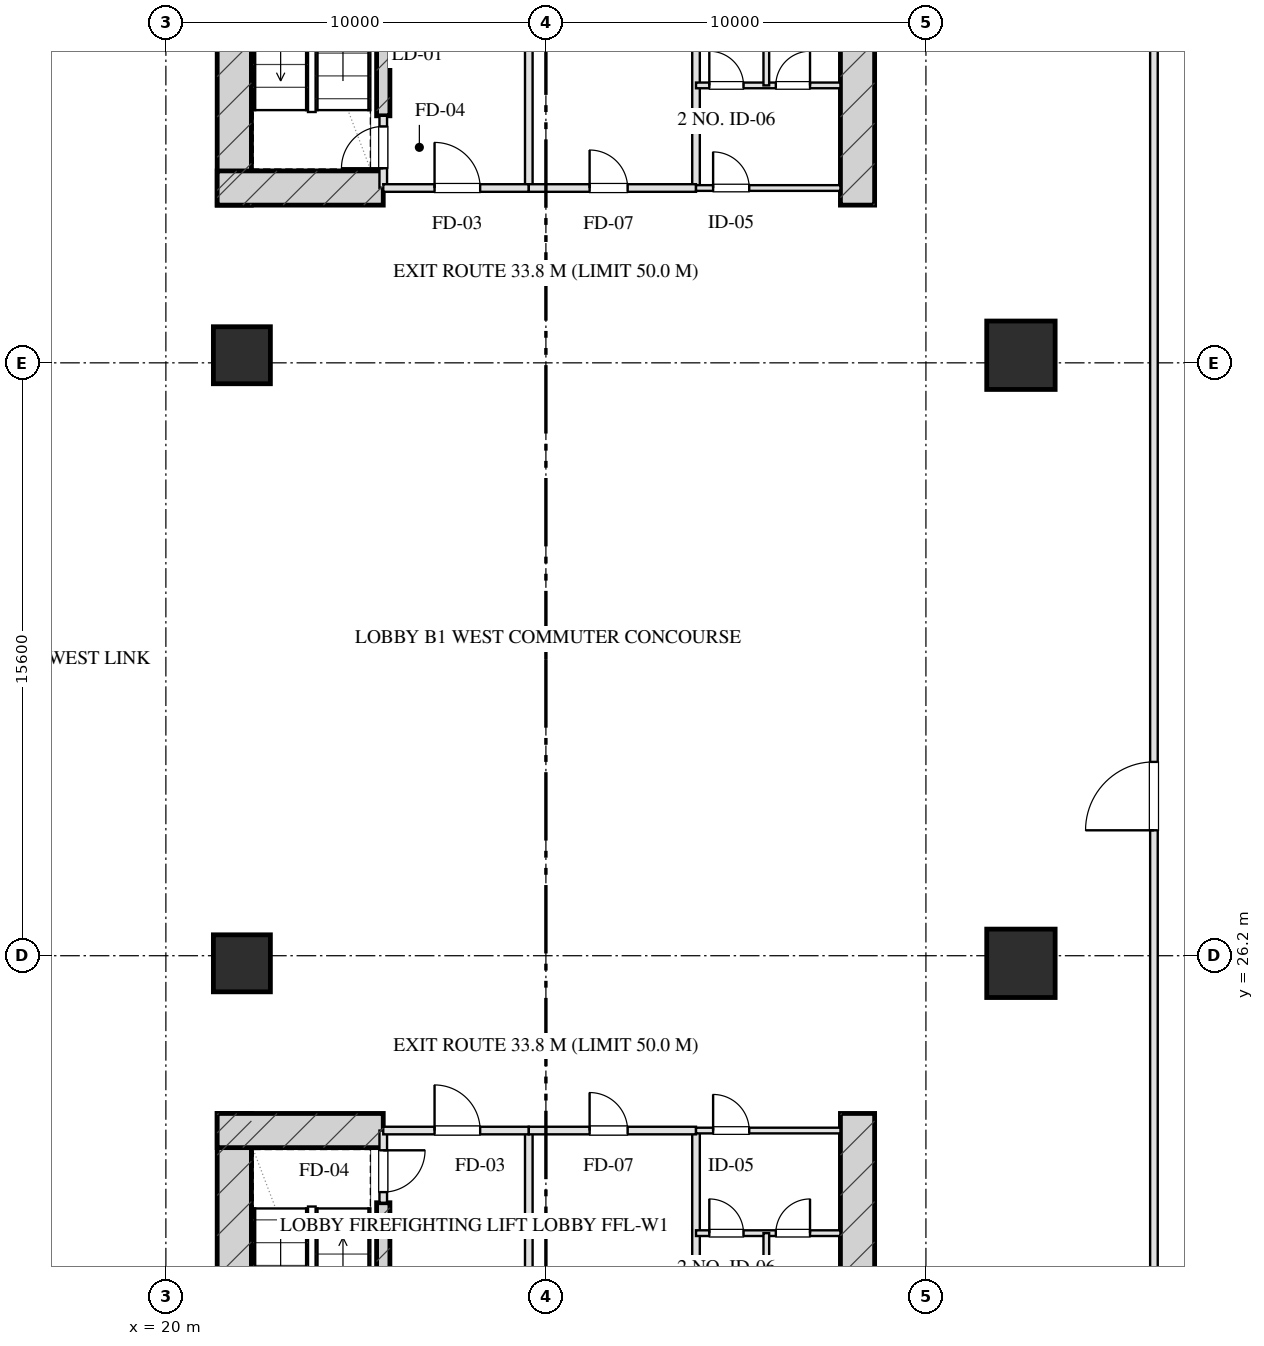
"""IFC4 building model, lengths in metres.
Left out: names, types, materials, properties, quantities, classifications, styles, units other than length and angle.
Written with IfcOpenShell. Run it as: python <this file> out.ifc"""

import sys

from ifc_helpers import new_model, si_unit, direction, frame, frame_2d, origin, origin_2d, place, context, subcontext, project, spatial, rectangle, hollow_rectangle, extrude, element, fill, save


model = new_model("IFC4")
c1 = context("Model", 3, precision=1e-05, world=origin(), true_north=direction((0.0, 1.0)))
c2 = subcontext(c1, "Body", "Model", "MODEL_VIEW")
j1 = project(units=[si_unit("LENGTHUNIT", "METRE"), si_unit("PLANEANGLEUNIT", "RADIAN")], contexts=[c1])
p1 = place(None, origin())
s1 = spatial("IfcSite", under=j1, at=p1, CompositionType="ELEMENT")
p2 = place(p1, origin())
s2 = spatial("IfcBuilding", under=s1, at=p2, CompositionType="ELEMENT")
p3 = place(p2, frame((0.0, 0.0, -6.0)))
s3 = spatial("IfcBuildingStorey", under=s2, at=p3, CompositionType="ELEMENT", Elevation=-6.0)
for number, where, z_axis, x_axis in (
    (1, (21.8, 22.05, 0.0), (0.0, 0.0, 1.0), (0.0, -1.0, 0.0)),
    (2, (38.2, 22.05, 0.0), (0.0, 0.0, 1.0), (0.0, -1.0, 0.0)),
):
    element("IfcWall", number, at=place(p3, frame(where, z_axis=z_axis, x_axis=x_axis)), inside=s3, PredefinedType="SHEAR", context=c2, shape_type="SweptSolid", body=[
        extrude(rectangle(XDim=9.78, YDim=0.9, at=frame_2d((4.89, 0.0))), origin(), (0.0, 0.0, 1.0), 6.0),
    ])
p4 = place(p3, frame((25.72, 19.7, 0.0), z_axis=(0.0, 0.0, 1.0), x_axis=(0.0, -1.0, 0.0)))
e3 = element("IfcWall", 3, at=p4, inside=s3, PredefinedType="SHEAR", context=c2, shape_type="SweptSolid", body=[
    extrude(rectangle(XDim=6.98, YDim=0.35, at=frame_2d((3.49, 0.0))), origin(), (0.0, 0.0, 1.0), 6.0),
])
p5 = place(p3, frame((21.35, 21.6, 0.0), z_axis=(0.0, 0.0, 1.0), x_axis=(1.0, 0.0, 0.0)))
e4 = element("IfcWall", 4, at=p5, inside=s3, PredefinedType="SHEAR", context=c2, shape_type="SweptSolid", body=[
    extrude(rectangle(XDim=4.37, YDim=0.9, at=frame_2d((2.185, 0.0))), origin(), (0.0, 0.0, 1.0), 6.0),
])
for number, where, z_axis, x_axis in (
    (5, (21.8, 45.95, 0.0), (0.0, 0.0, 1.0), (0.0, 1.0, 0.0)),
    (6, (38.2, 45.95, 0.0), (0.0, 0.0, 1.0), (0.0, 1.0, 0.0)),
):
    element("IfcWall", number, at=place(p3, frame(where, z_axis=z_axis, x_axis=x_axis)), inside=s3, PredefinedType="SHEAR", context=c2, shape_type="SweptSolid", body=[
        extrude(rectangle(XDim=9.78, YDim=0.9, at=frame_2d((4.89, 0.0))), origin(), (0.0, 0.0, 1.0), 6.0),
    ])
p6 = place(p3, frame((25.72, 48.3, 0.0), z_axis=(0.0, 0.0, 1.0), x_axis=(0.0, 1.0, 0.0)))
e7 = element("IfcWall", 7, at=p6, inside=s3, PredefinedType="SHEAR", context=c2, shape_type="SweptSolid", body=[
    extrude(rectangle(XDim=6.98, YDim=0.35, at=frame_2d((3.49, 0.0))), origin(), (0.0, 0.0, 1.0), 6.0),
])
p7 = place(p3, frame((21.35, 46.4, 0.0), z_axis=(0.0, 0.0, 1.0), x_axis=(1.0, 0.0, 0.0)))
e8 = element("IfcWall", 8, at=p7, inside=s3, PredefinedType="SHEAR", context=c2, shape_type="SweptSolid", body=[
    extrude(rectangle(XDim=4.37, YDim=0.9, at=frame_2d((2.185, 0.0))), origin(), (0.0, 0.0, 1.0), 6.0),
])
for number, where, z_axis, x_axis in (
    (9, (22.0, 26.0, 0.0), (0.0, 0.0, 1.0), (1.0, 0.0, 0.0)),
    (10, (22.0, 42.0, 0.0), (0.0, 0.0, 1.0), (1.0, 0.0, 0.0)),
):
    element("IfcColumn", number, at=place(p3, frame(where, z_axis=z_axis, x_axis=x_axis)), inside=s3, PredefinedType="COLUMN", context=c2, shape_type="SweptSolid", body=[
        extrude(rectangle(XDim=1.5, YDim=1.5, at=origin_2d()), origin(), (0.0, 0.0, 1.0), 6.001),
    ])
for number, where, z_axis, x_axis in (
    (11, (42.5, 26.0, 0.0), (0.0, 0.0, 1.0), (1.0, 0.0, 0.0)),
    (12, (42.5, 42.0, 0.0), (0.0, 0.0, 1.0), (1.0, 0.0, 0.0)),
):
    element("IfcColumn", number, at=place(p3, frame(where, z_axis=z_axis, x_axis=x_axis)), inside=s3, PredefinedType="COLUMN", context=c2, shape_type="SweptSolid", body=[
        extrude(hollow_rectangle(XDim=1.8, YDim=1.8, WallThickness=0.06, at=origin_2d()), origin(), (0.0, 0.0, 1.0), 6.001),
    ])
p8 = place(p3, frame((25.72, 21.6, 0.0), z_axis=(0.0, 0.0, 1.0), x_axis=(0.0, -1.0, 0.0)))
e13 = element("IfcWall", 13, at=p8, inside=s3, PredefinedType="PARTITIONING", context=c2, shape_type="SweptSolid", body=[
    extrude(rectangle(XDim=1.9, YDim=0.2, at=frame_2d((0.95, 0.0))), origin(), (0.0, 0.0, 1.0), 5.685),
])
p9 = place(p8, frame((0.52, 0.0, 0.0)))
e14 = element("IfcOpeningElement", 14, at=p9, cuts=e13, PredefinedType="OPENING", context=c2, shape_type="SweptSolid", body=[
    extrude(rectangle(XDim=1.1, YDim=2.05, at=frame_2d((0.55, 1.025))), frame((0.0, 0.11, 0.0), z_axis=(0.0, -1.0, 0.0), x_axis=(1.0, 0.0, 0.0)), (0.0, 0.0, 1.0), 0.22),
])
p10 = place(p3, frame((29.55, 21.6, 0.0), z_axis=(0.0, 0.0, 1.0), x_axis=(0.0, -1.0, 0.0)))
e15 = element("IfcWall", 15, at=p10, inside=s3, PredefinedType="PARTITIONING", context=c2, shape_type="SweptSolid", body=[
    extrude(rectangle(XDim=8.43, YDim=0.2, at=frame_2d((4.215, 0.0))), origin(), (0.0, 0.0, 1.0), 5.685),
])
p11 = place(p3, frame((25.72, 21.6, 0.0), z_axis=(0.0, 0.0, 1.0), x_axis=(1.0, 0.0, 0.0)))
e16 = element("IfcWall", 16, at=p11, inside=s3, PredefinedType="PARTITIONING", context=c2, shape_type="SweptSolid", body=[
    extrude(rectangle(XDim=3.83, YDim=0.2, at=frame_2d((1.915, 0.0))), origin(), (0.0, 0.0, 1.0), 5.685),
])
p12 = place(p11, frame((1.35, 0.0, 0.0)))
e17 = element("IfcOpeningElement", 17, at=p12, cuts=e16, PredefinedType="OPENING", context=c2, shape_type="SweptSolid", body=[
    extrude(rectangle(XDim=1.2, YDim=2.05, at=frame_2d((0.6, 1.025))), frame((0.0, 0.11, 0.0), z_axis=(0.0, -1.0, 0.0), x_axis=(1.0, 0.0, 0.0)), (0.0, 0.0, 1.0), 0.22),
])
p13 = place(p3, frame((33.95, 21.6, 0.0), z_axis=(0.0, 0.0, 1.0), x_axis=(0.0, -1.0, 0.0)))
e18 = element("IfcWall", 18, at=p13, inside=s3, PredefinedType="PARTITIONING", context=c2, shape_type="SweptSolid", body=[
    extrude(rectangle(XDim=8.43, YDim=0.2, at=frame_2d((4.215, 0.0))), origin(), (0.0, 0.0, 1.0), 5.685),
])
p14 = place(p3, frame((29.55, 21.6, 0.0), z_axis=(0.0, 0.0, 1.0), x_axis=(1.0, 0.0, 0.0)))
e19 = element("IfcWall", 19, at=p14, inside=s3, PredefinedType="PARTITIONING", context=c2, shape_type="SweptSolid", body=[
    extrude(rectangle(XDim=4.4, YDim=0.2, at=frame_2d((2.2, 0.0))), origin(), (0.0, 0.0, 1.0), 5.685),
])
p15 = place(p14, frame((1.6, 0.0, 0.0)))
e20 = element("IfcOpeningElement", 20, at=p15, cuts=e19, PredefinedType="OPENING", context=c2, shape_type="SweptSolid", body=[
    extrude(rectangle(XDim=1.0, YDim=2.05, at=frame_2d((0.5, 1.025))), frame((0.0, 0.11, 0.0), z_axis=(0.0, -1.0, 0.0), x_axis=(1.0, 0.0, 0.0)), (0.0, 0.0, 1.0), 0.22),
])
p16 = place(p3, frame((33.95, 21.6, 0.0), z_axis=(0.0, 0.0, 1.0), x_axis=(1.0, 0.0, 0.0)))
e21 = element("IfcWall", 21, at=p16, inside=s3, PredefinedType="PARTITIONING", context=c2, shape_type="SweptSolid", body=[
    extrude(rectangle(XDim=3.8, YDim=0.15, at=frame_2d((1.9, 0.0))), origin(), (0.0, 0.0, 1.0), 5.685),
])
p17 = place(p16, frame((0.45, 0.0, 0.0)))
e22 = element("IfcOpeningElement", 22, at=p17, cuts=e21, PredefinedType="OPENING", context=c2, shape_type="SweptSolid", body=[
    extrude(rectangle(XDim=0.95, YDim=2.05, at=frame_2d((0.475, 1.025))), frame((0.0, 0.085, 0.0), z_axis=(0.0, -1.0, 0.0), x_axis=(1.0, 0.0, 0.0)), (0.0, 0.0, 1.0), 0.17),
])
p18 = place(p3, frame((33.95, 18.9, 0.0), z_axis=(0.0, 0.0, 1.0), x_axis=(1.0, 0.0, 0.0)))
e23 = element("IfcWall", 23, at=p18, inside=s3, PredefinedType="PARTITIONING", context=c2, shape_type="SweptSolid", body=[
    extrude(rectangle(XDim=3.8, YDim=0.15, at=frame_2d((1.9, 0.0))), origin(), (0.0, 0.0, 1.0), 5.685),
])
p19 = place(p18, frame((0.35, 0.0, 0.0)))
e24 = element("IfcOpeningElement", 24, at=p19, cuts=e23, PredefinedType="OPENING", context=c2, shape_type="SweptSolid", body=[
    extrude(rectangle(XDim=0.9, YDim=2.05, at=frame_2d((0.45, 1.025))), frame((0.0, 0.085, 0.0), z_axis=(0.0, -1.0, 0.0), x_axis=(1.0, 0.0, 0.0)), (0.0, 0.0, 1.0), 0.17),
])
p20 = place(p18, frame((2.1, 0.0, 0.0)))
e25 = element("IfcOpeningElement", 25, at=p20, cuts=e23, PredefinedType="OPENING", context=c2, shape_type="SweptSolid", body=[
    extrude(rectangle(XDim=0.9, YDim=2.05, at=frame_2d((0.45, 1.025))), frame((0.0, 0.085, 0.0), z_axis=(0.0, -1.0, 0.0), x_axis=(1.0, 0.0, 0.0)), (0.0, 0.0, 1.0), 0.17),
])
p21 = place(p3, frame((35.8, 18.9, 0.0), z_axis=(0.0, 0.0, 1.0), x_axis=(0.0, -1.0, 0.0)))
e26 = element("IfcWall", 26, at=p21, inside=s3, PredefinedType="PARTITIONING", context=c2, shape_type="SweptSolid", body=[
    extrude(rectangle(XDim=5.73, YDim=0.15, at=frame_2d((2.865, 0.0))), origin(), (0.0, 0.0, 1.0), 5.685),
])
p22 = place(p3, frame((25.72, 46.4, 0.0), z_axis=(0.0, 0.0, 1.0), x_axis=(0.0, 1.0, 0.0)))
e27 = element("IfcWall", 27, at=p22, inside=s3, PredefinedType="PARTITIONING", context=c2, shape_type="SweptSolid", body=[
    extrude(rectangle(XDim=1.9, YDim=0.2, at=frame_2d((0.95, 0.0))), origin(), (0.0, 0.0, 1.0), 5.685),
])
p23 = place(p22, frame((0.52, 0.0, 0.0)))
e28 = element("IfcOpeningElement", 28, at=p23, cuts=e27, PredefinedType="OPENING", context=c2, shape_type="SweptSolid", body=[
    extrude(rectangle(XDim=1.1, YDim=2.05, at=frame_2d((0.55, 1.025))), frame((0.0, 0.11, 0.0), z_axis=(0.0, -1.0, 0.0), x_axis=(1.0, 0.0, 0.0)), (0.0, 0.0, 1.0), 0.22),
])
p24 = place(p3, frame((29.55, 46.4, 0.0), z_axis=(0.0, 0.0, 1.0), x_axis=(0.0, 1.0, 0.0)))
e29 = element("IfcWall", 29, at=p24, inside=s3, PredefinedType="PARTITIONING", context=c2, shape_type="SweptSolid", body=[
    extrude(rectangle(XDim=8.43, YDim=0.2, at=frame_2d((4.215, 0.0))), origin(), (0.0, 0.0, 1.0), 5.685),
])
p25 = place(p3, frame((25.72, 46.4, 0.0), z_axis=(0.0, 0.0, 1.0), x_axis=(1.0, 0.0, 0.0)))
e30 = element("IfcWall", 30, at=p25, inside=s3, PredefinedType="PARTITIONING", context=c2, shape_type="SweptSolid", body=[
    extrude(rectangle(XDim=3.83, YDim=0.2, at=frame_2d((1.915, 0.0))), origin(), (0.0, 0.0, 1.0), 5.685),
])
p26 = place(p25, frame((1.35, 0.0, 0.0)))
e31 = element("IfcOpeningElement", 31, at=p26, cuts=e30, PredefinedType="OPENING", context=c2, shape_type="SweptSolid", body=[
    extrude(rectangle(XDim=1.2, YDim=2.05, at=frame_2d((0.6, 1.025))), frame((0.0, 0.11, 0.0), z_axis=(0.0, -1.0, 0.0), x_axis=(1.0, 0.0, 0.0)), (0.0, 0.0, 1.0), 0.22),
])
p27 = place(p3, frame((33.95, 46.4, 0.0), z_axis=(0.0, 0.0, 1.0), x_axis=(0.0, 1.0, 0.0)))
e32 = element("IfcWall", 32, at=p27, inside=s3, PredefinedType="PARTITIONING", context=c2, shape_type="SweptSolid", body=[
    extrude(rectangle(XDim=8.43, YDim=0.2, at=frame_2d((4.215, 0.0))), origin(), (0.0, 0.0, 1.0), 5.685),
])
p28 = place(p3, frame((29.55, 46.4, 0.0), z_axis=(0.0, 0.0, 1.0), x_axis=(1.0, 0.0, 0.0)))
e33 = element("IfcWall", 33, at=p28, inside=s3, PredefinedType="PARTITIONING", context=c2, shape_type="SweptSolid", body=[
    extrude(rectangle(XDim=4.4, YDim=0.2, at=frame_2d((2.2, 0.0))), origin(), (0.0, 0.0, 1.0), 5.685),
])
p29 = place(p28, frame((1.6, 0.0, 0.0)))
e34 = element("IfcOpeningElement", 34, at=p29, cuts=e33, PredefinedType="OPENING", context=c2, shape_type="SweptSolid", body=[
    extrude(rectangle(XDim=1.0, YDim=2.05, at=frame_2d((0.5, 1.025))), frame((0.0, 0.11, 0.0), z_axis=(0.0, -1.0, 0.0), x_axis=(1.0, 0.0, 0.0)), (0.0, 0.0, 1.0), 0.22),
])
p30 = place(p3, frame((33.95, 46.4, 0.0), z_axis=(0.0, 0.0, 1.0), x_axis=(1.0, 0.0, 0.0)))
e35 = element("IfcWall", 35, at=p30, inside=s3, PredefinedType="PARTITIONING", context=c2, shape_type="SweptSolid", body=[
    extrude(rectangle(XDim=3.8, YDim=0.15, at=frame_2d((1.9, 0.0))), origin(), (0.0, 0.0, 1.0), 5.685),
])
p31 = place(p30, frame((0.45, 0.0, 0.0)))
e36 = element("IfcOpeningElement", 36, at=p31, cuts=e35, PredefinedType="OPENING", context=c2, shape_type="SweptSolid", body=[
    extrude(rectangle(XDim=0.95, YDim=2.05, at=frame_2d((0.475, 1.025))), frame((0.0, 0.085, 0.0), z_axis=(0.0, -1.0, 0.0), x_axis=(1.0, 0.0, 0.0)), (0.0, 0.0, 1.0), 0.17),
])
p32 = place(p3, frame((33.95, 49.1, 0.0), z_axis=(0.0, 0.0, 1.0), x_axis=(1.0, 0.0, 0.0)))
e37 = element("IfcWall", 37, at=p32, inside=s3, PredefinedType="PARTITIONING", context=c2, shape_type="SweptSolid", body=[
    extrude(rectangle(XDim=3.8, YDim=0.15, at=frame_2d((1.9, 0.0))), origin(), (0.0, 0.0, 1.0), 5.685),
])
p33 = place(p32, frame((0.35, 0.0, 0.0)))
e38 = element("IfcOpeningElement", 38, at=p33, cuts=e37, PredefinedType="OPENING", context=c2, shape_type="SweptSolid", body=[
    extrude(rectangle(XDim=0.9, YDim=2.05, at=frame_2d((0.45, 1.025))), frame((0.0, 0.085, 0.0), z_axis=(0.0, -1.0, 0.0), x_axis=(1.0, 0.0, 0.0)), (0.0, 0.0, 1.0), 0.17),
])
p34 = place(p32, frame((2.1, 0.0, 0.0)))
e39 = element("IfcOpeningElement", 39, at=p34, cuts=e37, PredefinedType="OPENING", context=c2, shape_type="SweptSolid", body=[
    extrude(rectangle(XDim=0.9, YDim=2.05, at=frame_2d((0.45, 1.025))), frame((0.0, 0.085, 0.0), z_axis=(0.0, -1.0, 0.0), x_axis=(1.0, 0.0, 0.0)), (0.0, 0.0, 1.0), 0.17),
])
p35 = place(p3, frame((35.8, 49.1, 0.0), z_axis=(0.0, 0.0, 1.0), x_axis=(0.0, 1.0, 0.0)))
e40 = element("IfcWall", 40, at=p35, inside=s3, PredefinedType="PARTITIONING", context=c2, shape_type="SweptSolid", body=[
    extrude(rectangle(XDim=5.73, YDim=0.15, at=frame_2d((2.865, 0.0))), origin(), (0.0, 0.0, 1.0), 5.685),
])
p36 = place(p3, frame((46.0, 11.5, 0.0), z_axis=(0.0, 0.0, 1.0), x_axis=(0.0, 1.0, 0.0)))
e41 = element("IfcWall", 41, at=p36, inside=s3, PredefinedType="PARTITIONING", context=c2, shape_type="SweptSolid", body=[
    extrude(rectangle(XDim=45.0, YDim=0.2, at=frame_2d((22.5, 0.0))), origin(), (0.0, 0.0, 1.0), 5.685),
])
p37 = place(p36, frame((18.0, 0.0, 0.0)))
e42 = element("IfcOpeningElement", 42, at=p37, cuts=e41, PredefinedType="OPENING", context=c2, shape_type="SweptSolid", body=[
    extrude(rectangle(XDim=1.8, YDim=2.05, at=frame_2d((0.9, 1.025))), frame((0.0, 0.11, 0.0), z_axis=(0.0, -1.0, 0.0), x_axis=(1.0, 0.0, 0.0)), (0.0, 0.0, 1.0), 0.22),
])
p38 = place(p9, origin())
e43 = element("IfcDoor", 43, at=p38, inside=s3, OperationType="SINGLE_SWING_LEFT", PredefinedType="DOOR", context=c2, shape_type="SweptSolid", body=[
    extrude(rectangle(XDim=1.1, YDim=2.05, at=frame_2d((0.55, 1.025))), frame((0.0, 0.025, 0.0), z_axis=(0.0, -1.0, 0.0), x_axis=(1.0, 0.0, 0.0)), (0.0, 0.0, 1.0), 0.05),
])
fill(e14, e43)
p39 = place(p12, origin())
e44 = element("IfcDoor", 44, at=p39, inside=s3, OperationType="SINGLE_SWING_LEFT", PredefinedType="DOOR", context=c2, shape_type="SweptSolid", body=[
    extrude(rectangle(XDim=1.2, YDim=2.05, at=frame_2d((0.6, 1.025))), frame((0.0, 0.025, 0.0), z_axis=(0.0, -1.0, 0.0), x_axis=(1.0, 0.0, 0.0)), (0.0, 0.0, 1.0), 0.05),
])
fill(e17, e44)
p40 = place(p15, origin())
e45 = element("IfcDoor", 45, at=p40, inside=s3, OperationType="SINGLE_SWING_LEFT", PredefinedType="DOOR", context=c2, shape_type="SweptSolid", body=[
    extrude(rectangle(XDim=1.0, YDim=2.05, at=frame_2d((0.5, 1.025))), frame((0.0, 0.025, 0.0), z_axis=(0.0, -1.0, 0.0), x_axis=(1.0, 0.0, 0.0)), (0.0, 0.0, 1.0), 0.05),
])
fill(e20, e45)
p41 = place(p17, origin())
e46 = element("IfcDoor", 46, at=p41, inside=s3, OperationType="SINGLE_SWING_LEFT", PredefinedType="DOOR", context=c2, shape_type="SweptSolid", body=[
    extrude(rectangle(XDim=0.95, YDim=2.05, at=frame_2d((0.475, 1.025))), frame((0.0, 0.025, 0.0), z_axis=(0.0, -1.0, 0.0), x_axis=(1.0, 0.0, 0.0)), (0.0, 0.0, 1.0), 0.05),
])
fill(e22, e46)
p42 = place(p19, origin())
e47 = element("IfcDoor", 47, at=p42, inside=s3, OperationType="SINGLE_SWING_LEFT", PredefinedType="DOOR", context=c2, shape_type="SweptSolid", body=[
    extrude(rectangle(XDim=0.9, YDim=2.05, at=frame_2d((0.45, 1.025))), frame((0.0, 0.025, 0.0), z_axis=(0.0, -1.0, 0.0), x_axis=(1.0, 0.0, 0.0)), (0.0, 0.0, 1.0), 0.05),
])
fill(e24, e47)
p43 = place(p20, origin())
e48 = element("IfcDoor", 48, at=p43, inside=s3, OperationType="SINGLE_SWING_RIGHT", PredefinedType="DOOR", context=c2, shape_type="SweptSolid", body=[
    extrude(rectangle(XDim=0.9, YDim=2.05, at=frame_2d((0.45, 1.025))), frame((0.0, 0.025, 0.0), z_axis=(0.0, -1.0, 0.0), x_axis=(1.0, 0.0, 0.0)), (0.0, 0.0, 1.0), 0.05),
])
fill(e25, e48)
p44 = place(p23, origin())
e49 = element("IfcDoor", 49, at=p44, inside=s3, OperationType="SINGLE_SWING_LEFT", PredefinedType="DOOR", context=c2, shape_type="SweptSolid", body=[
    extrude(rectangle(XDim=1.1, YDim=2.05, at=frame_2d((0.55, 1.025))), frame((0.0, 0.025, 0.0), z_axis=(0.0, -1.0, 0.0), x_axis=(1.0, 0.0, 0.0)), (0.0, 0.0, 1.0), 0.05),
])
fill(e28, e49)
p45 = place(p26, origin())
e50 = element("IfcDoor", 50, at=p45, inside=s3, OperationType="SINGLE_SWING_LEFT", PredefinedType="DOOR", context=c2, shape_type="SweptSolid", body=[
    extrude(rectangle(XDim=1.2, YDim=2.05, at=frame_2d((0.6, 1.025))), frame((0.0, 0.025, 0.0), z_axis=(0.0, -1.0, 0.0), x_axis=(1.0, 0.0, 0.0)), (0.0, 0.0, 1.0), 0.05),
])
fill(e31, e50)
p46 = place(p29, origin())
e51 = element("IfcDoor", 51, at=p46, inside=s3, OperationType="SINGLE_SWING_LEFT", PredefinedType="DOOR", context=c2, shape_type="SweptSolid", body=[
    extrude(rectangle(XDim=1.0, YDim=2.05, at=frame_2d((0.5, 1.025))), frame((0.0, 0.025, 0.0), z_axis=(0.0, -1.0, 0.0), x_axis=(1.0, 0.0, 0.0)), (0.0, 0.0, 1.0), 0.05),
])
fill(e34, e51)
p47 = place(p31, origin())
e52 = element("IfcDoor", 52, at=p47, inside=s3, OperationType="SINGLE_SWING_LEFT", PredefinedType="DOOR", context=c2, shape_type="SweptSolid", body=[
    extrude(rectangle(XDim=0.95, YDim=2.05, at=frame_2d((0.475, 1.025))), frame((0.0, 0.025, 0.0), z_axis=(0.0, -1.0, 0.0), x_axis=(1.0, 0.0, 0.0)), (0.0, 0.0, 1.0), 0.05),
])
fill(e36, e52)
p48 = place(p33, origin())
e53 = element("IfcDoor", 53, at=p48, inside=s3, OperationType="SINGLE_SWING_LEFT", PredefinedType="DOOR", context=c2, shape_type="SweptSolid", body=[
    extrude(rectangle(XDim=0.9, YDim=2.05, at=frame_2d((0.45, 1.025))), frame((0.0, 0.025, 0.0), z_axis=(0.0, -1.0, 0.0), x_axis=(1.0, 0.0, 0.0)), (0.0, 0.0, 1.0), 0.05),
])
fill(e38, e53)
p49 = place(p34, origin())
e54 = element("IfcDoor", 54, at=p49, inside=s3, OperationType="SINGLE_SWING_RIGHT", PredefinedType="DOOR", context=c2, shape_type="SweptSolid", body=[
    extrude(rectangle(XDim=0.9, YDim=2.05, at=frame_2d((0.45, 1.025))), frame((0.0, 0.025, 0.0), z_axis=(0.0, -1.0, 0.0), x_axis=(1.0, 0.0, 0.0)), (0.0, 0.0, 1.0), 0.05),
])
fill(e39, e54)
p50 = place(p37, origin())
e55 = element("IfcDoor", 55, at=p50, inside=s3, OperationType="SINGLE_SWING_LEFT", PredefinedType="DOOR", context=c2, shape_type="SweptSolid", body=[
    extrude(rectangle(XDim=1.8, YDim=2.05, at=frame_2d((0.9, 1.025))), frame((0.0, 0.025, 0.0), z_axis=(0.0, -1.0, 0.0), x_axis=(1.0, 0.0, 0.0)), (0.0, 0.0, 1.0), 0.05),
])
fill(e42, e55)
save(model, sys.argv[1])
